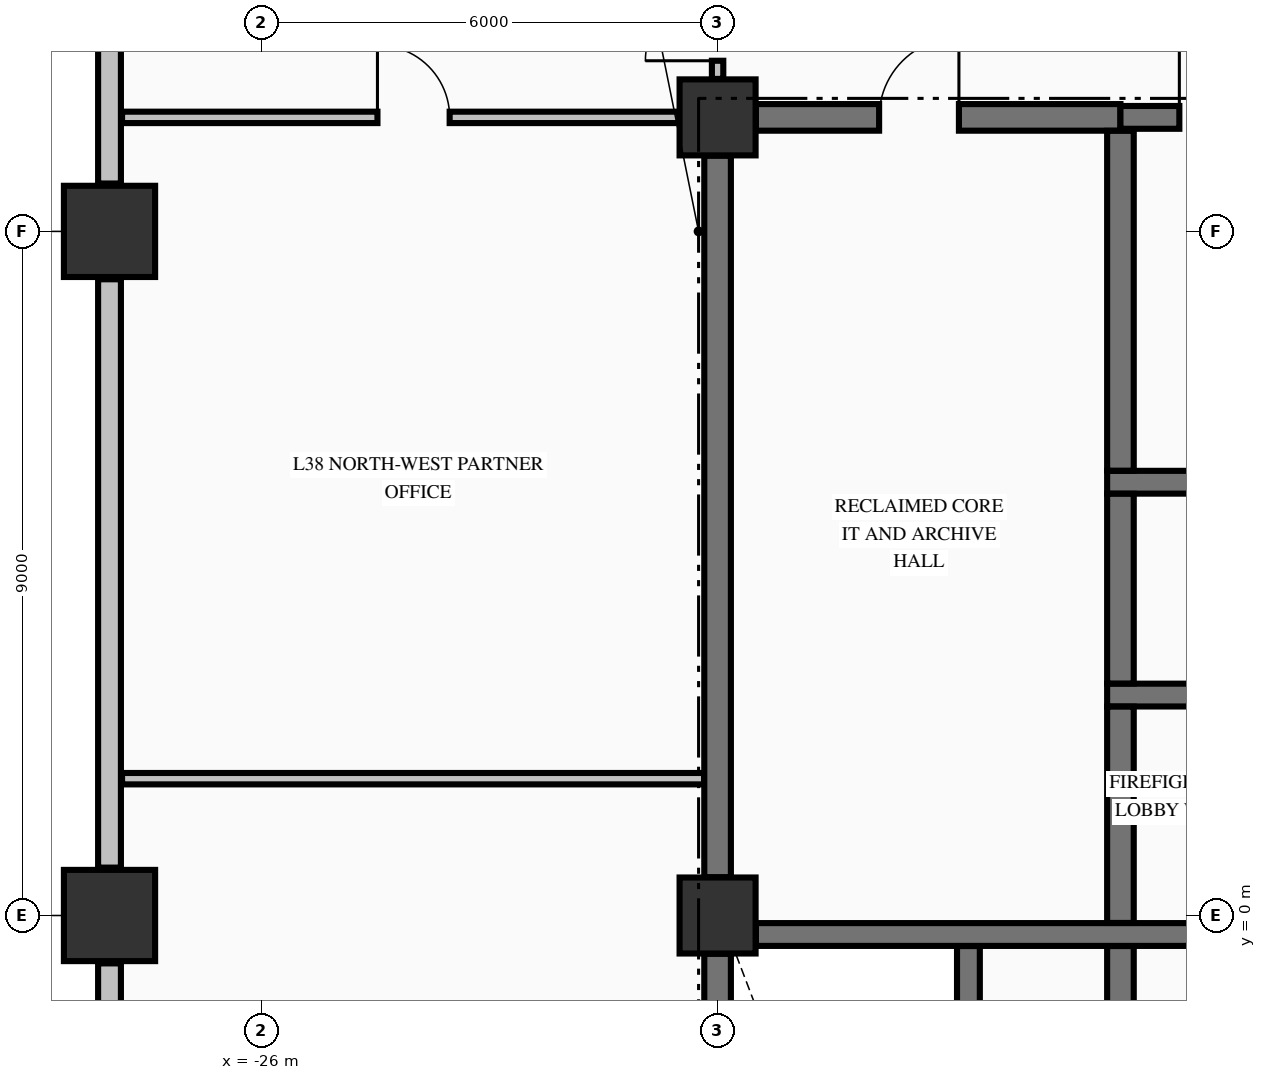
"""IFC4 building model, lengths in metres.
Left out: names, types, materials, properties, quantities, classifications, styles, units other than length and angle.
Written with IfcOpenShell. Run it as: python <this file> out.ifc"""

import sys

from ifc_helpers import new_model, si_unit, direction, frame, frame_2d, origin, origin_2d, place, context, subcontext, project, spatial, rectangle, extrude, element, fill, save


model = new_model("IFC4")
c1 = context("Model", 3, precision=1e-05, world=origin(), true_north=direction((0.0, 1.0)))
c2 = subcontext(c1, "Body", "Model", "MODEL_VIEW")
j1 = project(units=[si_unit("LENGTHUNIT", "METRE"), si_unit("PLANEANGLEUNIT", "RADIAN")], contexts=[c1])
p1 = place(None, origin())
s1 = spatial("IfcSite", under=j1, at=p1, CompositionType="ELEMENT")
p2 = place(p1, origin())
s2 = spatial("IfcBuilding", under=s1, at=p2, CompositionType="ELEMENT")
p3 = place(p2, frame((0.0, 0.0, 149.91)))
s3 = spatial("IfcBuildingStorey", under=s2, at=p3, CompositionType="ELEMENT", Elevation=149.91)
for number, where, z_axis, x_axis in (
    (1, (-28.0, 0.0, -0.25), (0.0, 0.0, 1.0), (1.0, 0.0, 0.0)),
    (2, (-28.0, 9.0, -0.25), (0.0, 0.0, 1.0), (1.0, 0.0, 0.0)),
):
    element("IfcColumn", number, at=place(p3, frame(where, z_axis=z_axis, x_axis=x_axis)), inside=s3, PredefinedType="COLUMN", context=c2, shape_type="SweptSolid", body=[
        extrude(rectangle(XDim=1.2, YDim=1.2, at=origin_2d()), origin(), (0.0, 0.0, 1.0), 3.395),
    ])
for number, where, z_axis, x_axis in (
    (3, (-20.0, 10.5, -0.25), (0.0, 0.0, 1.0), (1.0, 0.0, 0.0)),
    (4, (-20.0, 0.0, -0.25), (0.0, 0.0, 1.0), (1.0, 0.0, 0.0)),
):
    element("IfcColumn", number, at=place(p3, frame(where, z_axis=z_axis, x_axis=x_axis)), inside=s3, PredefinedType="COLUMN", context=c2, shape_type="SweptSolid", body=[
        extrude(rectangle(XDim=1.0, YDim=1.0, at=origin_2d()), origin(), (0.0, 0.0, 1.0), 3.395),
    ])
for number, where, z_axis, x_axis in (
    (5, (-28.0, -0.63, 0.0), (0.0, 0.0, 1.0), (0.0, -1.0, 0.0)),
    (6, (-28.0, 8.37, 0.0), (0.0, 0.0, 1.0), (0.0, -1.0, 0.0)),
):
    element("IfcWall", number, at=place(p3, frame(where, z_axis=z_axis, x_axis=x_axis)), inside=s3, PredefinedType="STANDARD", context=c2, shape_type="SweptSolid", body=[
        extrude(rectangle(XDim=7.74, YDim=0.3, at=frame_2d((3.87, 0.0))), origin(), (0.0, 0.0, 1.0), 2.537),
    ])
p4 = place(p3, frame((-28.0, 20.37, 0.0), z_axis=(0.0, 0.0, 1.0), x_axis=(0.0, -1.0, 0.0)))
e7 = element("IfcWall", 7, at=p4, inside=s3, PredefinedType="STANDARD", context=c2, shape_type="SweptSolid", body=[
    extrude(rectangle(XDim=10.74, YDim=0.3, at=frame_2d((5.37, 0.0))), origin(), (0.0, 0.0, 1.0), 2.537),
])
p5 = place(p3, frame((-19.496, -0.25, 0.0), z_axis=(0.0, 0.0, 1.0), x_axis=(1.0, 0.0, 0.0)))
e8 = element("IfcWall", 8, at=p5, inside=s3, PredefinedType="SHEAR", context=c2, shape_type="SweptSolid", body=[
    extrude(rectangle(XDim=7.992, YDim=0.3, at=frame_2d((3.996, 0.0))), origin(), (0.0, 0.0, 1.0), 3.145),
])
p6 = place(p5, frame((5.796, 0.0, 0.0)))
e9 = element("IfcOpeningElement", 9, at=p6, cuts=e8, PredefinedType="OPENING", context=c2, shape_type="SweptSolid", body=[
    extrude(rectangle(XDim=1.1, YDim=2.15, at=frame_2d((0.55, 1.075))), frame((0.0, 0.16, 0.0), z_axis=(0.0, -1.0, 0.0), x_axis=(1.0, 0.0, 0.0)), (0.0, 0.0, 1.0), 0.32),
])
p7 = place(p3, frame((-14.875, 2.9, 0.0), z_axis=(0.0, 0.0, 1.0), x_axis=(1.0, 0.0, 0.0)))
e10 = element("IfcWall", 10, at=p7, inside=s3, PredefinedType="SHEAR", context=c2, shape_type="SweptSolid", body=[
    extrude(rectangle(XDim=4.025, YDim=0.3, at=frame_2d((2.012, 0.0))), origin(), (0.0, 0.0, 1.0), 3.145),
])
p8 = place(p7, frame((2.075, 0.0, 0.0)))
e11 = element("IfcOpeningElement", 11, at=p8, cuts=e10, PredefinedType="OPENING", context=c2, shape_type="SweptSolid", body=[
    extrude(rectangle(XDim=1.1, YDim=2.2, at=frame_2d((0.55, 1.1))), frame((0.0, 0.16, 0.0), z_axis=(0.0, -1.0, 0.0), x_axis=(1.0, 0.0, 0.0)), (0.0, 0.0, 1.0), 0.32),
])
p9 = place(p3, frame((-14.875, 5.7, 0.0), z_axis=(0.0, 0.0, 1.0), x_axis=(1.0, 0.0, 0.0)))
e12 = element("IfcWall", 12, at=p9, inside=s3, PredefinedType="SHEAR", context=c2, shape_type="SweptSolid", body=[
    extrude(rectangle(XDim=4.025, YDim=0.3, at=frame_2d((2.012, 0.0))), origin(), (0.0, 0.0, 1.0), 3.145),
])
p10 = place(p3, frame((-19.496, 10.5, 0.0), z_axis=(0.0, 0.0, 1.0), x_axis=(1.0, 0.0, 0.0)))
e13 = element("IfcWall", 13, at=p10, inside=s3, PredefinedType="SHEAR", context=c2, shape_type="SweptSolid", body=[
    extrude(rectangle(XDim=4.796, YDim=0.35, at=frame_2d((2.398, 0.0))), origin(), (0.0, 0.0, 1.0), 3.145),
])
p11 = place(p10, frame((1.621, 0.0, 0.0)))
e14 = element("IfcOpeningElement", 14, at=p11, cuts=e13, PredefinedType="OPENING", context=c2, shape_type="SweptSolid", body=[
    extrude(rectangle(XDim=1.05, YDim=2.15, at=frame_2d((0.525, 1.075))), frame((0.0, 0.185, 0.0), z_axis=(0.0, -1.0, 0.0), x_axis=(1.0, 0.0, 0.0)), (0.0, 0.0, 1.0), 0.37),
])
p12 = place(p3, frame((-14.7, 10.5, 0.0), z_axis=(0.0, 0.0, 1.0), x_axis=(1.0, 0.0, 0.0)))
e15 = element("IfcWall", 15, at=p12, inside=s3, PredefinedType="SHEAR", context=c2, shape_type="SweptSolid", body=[
    extrude(rectangle(XDim=3.196, YDim=0.3, at=frame_2d((1.598, 0.0))), origin(), (0.0, 0.0, 1.0), 3.145),
])
p13 = place(p12, frame((0.775, 0.0, 0.0)))
e16 = element("IfcOpeningElement", 16, at=p13, cuts=e15, PredefinedType="OPENING", context=c2, shape_type="SweptSolid", body=[
    extrude(rectangle(XDim=0.95, YDim=2.15, at=frame_2d((0.475, 1.075))), frame((0.0, 0.16, 0.0), z_axis=(0.0, -1.0, 0.0), x_axis=(1.0, 0.0, 0.0)), (0.0, 0.0, 1.0), 0.32),
])
p14 = place(p3, frame((-27.835, 1.8, 0.0), z_axis=(0.0, 0.0, 1.0), x_axis=(1.0, 0.0, 0.0)))
e17 = element("IfcWall", 17, at=p14, inside=s3, PredefinedType="PARTITIONING", context=c2, shape_type="SweptSolid", body=[
    extrude(rectangle(XDim=7.657, YDim=0.15, at=frame_2d((3.829, 0.0))), origin(), (0.0, 0.0, 1.0), 3.145),
])
p15 = place(p3, frame((-27.835, 10.5, 0.0), z_axis=(0.0, 0.0, 1.0), x_axis=(1.0, 0.0, 0.0)))
e18 = element("IfcWall", 18, at=p15, inside=s3, PredefinedType="PARTITIONING", context=c2, shape_type="SweptSolid", body=[
    extrude(rectangle(XDim=7.329, YDim=0.15, at=frame_2d((3.665, 0.0))), origin(), (0.0, 0.0, 1.0), 3.145),
])
p16 = place(p15, frame((3.36, 0.0, 0.0)))
e19 = element("IfcOpeningElement", 19, at=p16, cuts=e18, PredefinedType="OPENING", context=c2, shape_type="SweptSolid", body=[
    extrude(rectangle(XDim=0.95, YDim=2.15, at=frame_2d((0.475, 1.075))), frame((0.0, 0.085, 0.0), z_axis=(0.0, -1.0, 0.0), x_axis=(1.0, 0.0, 0.0)), (0.0, 0.0, 1.0), 0.17),
])
p17 = place(p3, frame((-20.0, -9.446, 0.0), z_axis=(0.0, 0.0, 1.0), x_axis=(0.0, 1.0, 0.0)))
e20 = element("IfcWall", 20, at=p17, inside=s3, PredefinedType="SHEAR", context=c2, shape_type="SweptSolid", body=[
    extrude(rectangle(XDim=8.942, YDim=0.35, at=frame_2d((4.471, 0.0))), origin(), (0.0, 0.0, 1.0), 3.145),
])
p18 = place(p3, frame((-20.0, 0.504, 0.0), z_axis=(0.0, 0.0, 1.0), x_axis=(0.0, 1.0, 0.0)))
e21 = element("IfcWall", 21, at=p18, inside=s3, PredefinedType="SHEAR", context=c2, shape_type="SweptSolid", body=[
    extrude(rectangle(XDim=9.492, YDim=0.35, at=frame_2d((4.746, 0.0))), origin(), (0.0, 0.0, 1.0), 3.145),
])
p19 = place(p3, frame((-16.7, -9.773, 0.0), z_axis=(0.0, 0.0, 1.0), x_axis=(0.0, 1.0, 0.0)))
e22 = element("IfcWall", 22, at=p19, inside=s3, PredefinedType="SHEAR", context=c2, shape_type="SweptSolid", body=[
    extrude(rectangle(XDim=9.371, YDim=0.3, at=frame_2d((4.686, 0.0))), origin(), (0.0, 0.0, 1.0), 3.145),
])
p20 = place(p3, frame((-14.7, -9.773, 0.0), z_axis=(0.0, 0.0, 1.0), x_axis=(0.0, 1.0, 0.0)))
e23 = element("IfcWall", 23, at=p20, inside=s3, PredefinedType="SHEAR", context=c2, shape_type="SweptSolid", body=[
    extrude(rectangle(XDim=9.371, YDim=0.35, at=frame_2d((4.686, 0.0))), origin(), (0.0, 0.0, 1.0), 3.145),
])
p21 = place(p3, frame((-14.7, -0.098, 0.0), z_axis=(0.0, 0.0, 1.0), x_axis=(0.0, 1.0, 0.0)))
e24 = element("IfcWall", 24, at=p21, inside=s3, PredefinedType="SHEAR", context=c2, shape_type="SweptSolid", body=[
    extrude(rectangle(XDim=2.846, YDim=0.35, at=frame_2d((1.423, 0.0))), origin(), (0.0, 0.0, 1.0), 3.145),
])
p22 = place(p3, frame((-14.7, 3.052, 0.0), z_axis=(0.0, 0.0, 1.0), x_axis=(0.0, 1.0, 0.0)))
e25 = element("IfcWall", 25, at=p22, inside=s3, PredefinedType="SHEAR", context=c2, shape_type="SweptSolid", body=[
    extrude(rectangle(XDim=2.496, YDim=0.35, at=frame_2d((1.248, 0.0))), origin(), (0.0, 0.0, 1.0), 3.145),
])
p23 = place(p3, frame((-14.7, 5.852, 0.0), z_axis=(0.0, 0.0, 1.0), x_axis=(0.0, 1.0, 0.0)))
e26 = element("IfcWall", 26, at=p23, inside=s3, PredefinedType="SHEAR", context=c2, shape_type="SweptSolid", body=[
    extrude(rectangle(XDim=4.471, YDim=0.35, at=frame_2d((2.235, 0.0))), origin(), (0.0, 0.0, 1.0), 3.145),
])
p24 = place(p3, frame((-20.0, 11.006, 0.0), z_axis=(0.0, 0.0, 1.0), x_axis=(0.0, 1.0, 0.0)))
e27 = element("IfcWall", 27, at=p24, inside=s3, PredefinedType="PARTITIONING", context=c2, shape_type="SweptSolid", body=[
    extrude(rectangle(XDim=1.866, YDim=0.15, at=frame_2d((0.933, 0.0))), origin(), (0.0, 0.0, 1.0), 2.635),
])
p25 = place(p24, frame((0.239, 0.0, 0.0)))
e28 = element("IfcOpeningElement", 28, at=p25, cuts=e27, PredefinedType="OPENING", context=c2, shape_type="SweptSolid", body=[
    extrude(rectangle(XDim=0.95, YDim=2.15, at=frame_2d((0.475, 1.075))), frame((0.0, 0.085, 0.0), z_axis=(0.0, -1.0, 0.0), x_axis=(1.0, 0.0, 0.0)), (0.0, 0.0, 1.0), 0.17),
])
p26 = place(p13, origin())
e29 = element("IfcDoor", 29, at=p26, inside=s3, OperationType="SINGLE_SWING_LEFT", PredefinedType="DOOR", context=c2, shape_type="SweptSolid", body=[
    extrude(rectangle(XDim=0.95, YDim=2.15, at=frame_2d((0.475, 1.075))), frame((0.0, 0.025, 0.0), z_axis=(0.0, -1.0, 0.0), x_axis=(1.0, 0.0, 0.0)), (0.0, 0.0, 1.0), 0.05),
])
fill(e16, e29)
p27 = place(p11, origin())
e30 = element("IfcDoor", 30, at=p27, inside=s3, OperationType="SINGLE_SWING_RIGHT", PredefinedType="DOOR", context=c2, shape_type="SweptSolid", body=[
    extrude(rectangle(XDim=1.05, YDim=2.15, at=frame_2d((0.525, 1.075))), frame((0.0, 0.025, 0.0), z_axis=(0.0, -1.0, 0.0), x_axis=(1.0, 0.0, 0.0)), (0.0, 0.0, 1.0), 0.05),
])
fill(e14, e30)
p28 = place(p25, origin())
e31 = element("IfcDoor", 31, at=p28, inside=s3, OperationType="SINGLE_SWING_LEFT", PredefinedType="DOOR", context=c2, shape_type="SweptSolid", body=[
    extrude(rectangle(XDim=0.95, YDim=2.15, at=frame_2d((0.475, 1.075))), frame((0.0, 0.025, 0.0), z_axis=(0.0, -1.0, 0.0), x_axis=(1.0, 0.0, 0.0)), (0.0, 0.0, 1.0), 0.05),
])
fill(e28, e31)
p29 = place(p16, origin())
e32 = element("IfcDoor", 32, at=p29, inside=s3, OperationType="SINGLE_SWING_LEFT", PredefinedType="DOOR", context=c2, shape_type="SweptSolid", body=[
    extrude(rectangle(XDim=0.95, YDim=2.15, at=frame_2d((0.475, 1.075))), frame((0.0, 0.025, 0.0), z_axis=(0.0, -1.0, 0.0), x_axis=(1.0, 0.0, 0.0)), (0.0, 0.0, 1.0), 0.05),
])
fill(e19, e32)
save(model, sys.argv[1])
